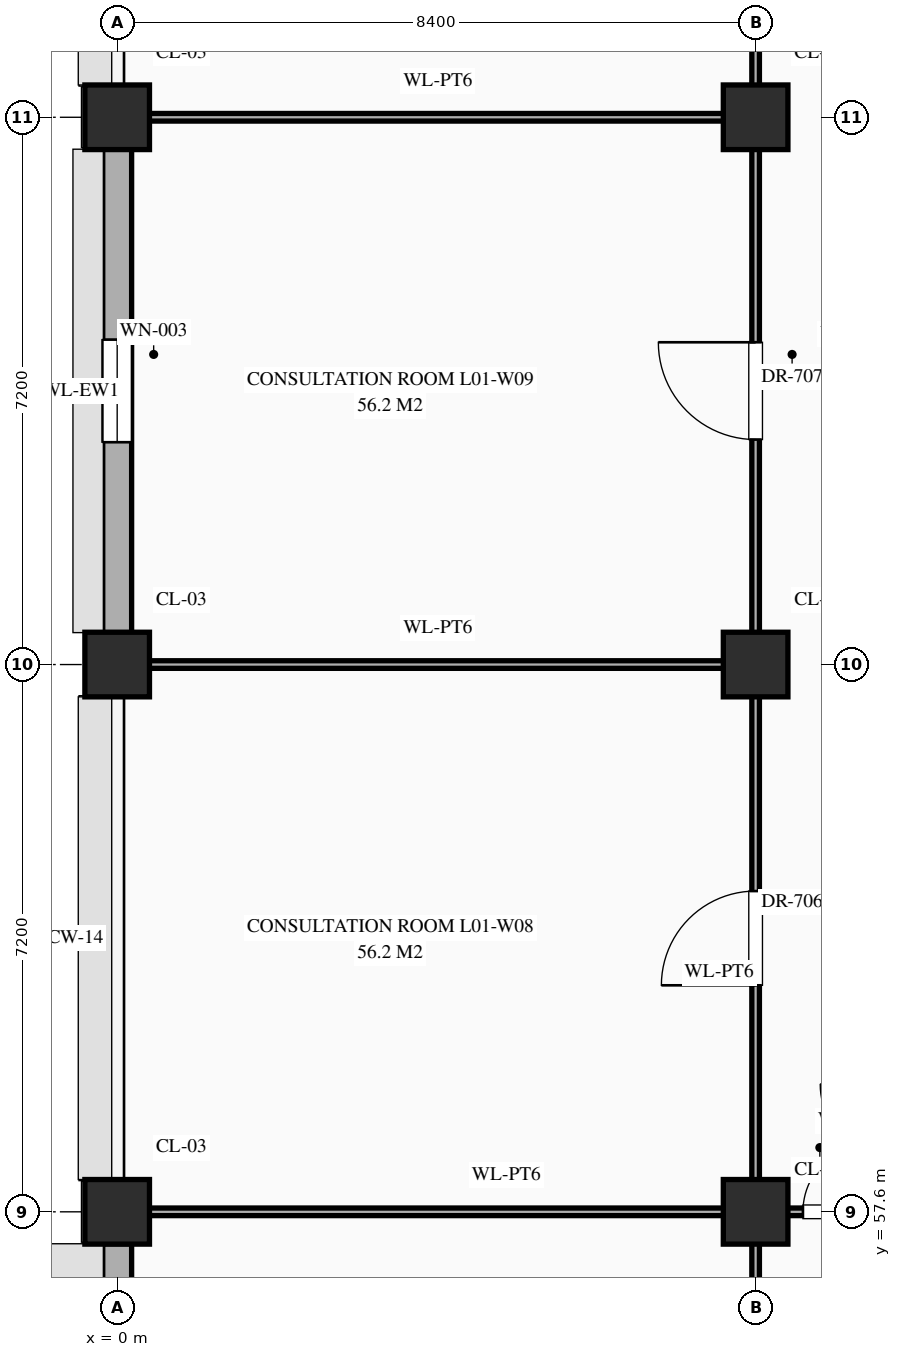
"""IFC4 building model, lengths in metres.
Left out: names, types, materials, properties, quantities, classifications, styles, units other than length and angle.
Written with IfcOpenShell. Run it as: python <this file> out.ifc"""

import sys

from ifc_helpers import new_model, si_unit, direction, frame, frame_2d, origin, origin_2d, place, context, subcontext, project, spatial, rectangle, extrude, element, fill, save


model = new_model("IFC4")
c1 = context("Model", 3, precision=1e-05, world=origin(), true_north=direction((0.0, 1.0)))
c2 = subcontext(c1, "Body", "Model", "MODEL_VIEW")
j1 = project(units=[si_unit("LENGTHUNIT", "METRE"), si_unit("PLANEANGLEUNIT", "RADIAN")], contexts=[c1])
p1 = place(None, origin())
s1 = spatial("IfcSite", under=j1, at=p1, CompositionType="ELEMENT")
p2 = place(p1, origin())
s2 = spatial("IfcBuilding", under=s1, at=p2, CompositionType="ELEMENT")
p3 = place(p2, origin())
s3 = spatial("IfcBuildingStorey", under=s2, at=p3, CompositionType="ELEMENT", Elevation=0.0)
for number, where, z_axis, x_axis in (
    (1, (0.0, 57.6, 0.0), (0.0, 0.0, 1.0), (1.0, 0.0, 0.0)),
    (2, (0.0, 64.8, 0.0), (0.0, 0.0, 1.0), (1.0, 0.0, 0.0)),
    (3, (0.0, 72.0, 0.0), (0.0, 0.0, 1.0), (1.0, 0.0, 0.0)),
    (4, (8.4, 57.6, 0.0), (0.0, 0.0, 1.0), (1.0, 0.0, 0.0)),
    (5, (8.4, 64.8, 0.0), (0.0, 0.0, 1.0), (1.0, 0.0, 0.0)),
    (6, (8.4, 72.0, 0.0), (0.0, 0.0, 1.0), (1.0, 0.0, 0.0)),
):
    element("IfcColumn", number, at=place(p3, frame(where, z_axis=z_axis, x_axis=x_axis)), inside=s3, PredefinedType="COLUMN", context=c2, shape_type="SweptSolid", body=[
        extrude(rectangle(XDim=0.85, YDim=0.85, at=origin_2d()), origin(), (0.0, 0.0, 1.0), 5.4),
    ])
p4 = place(p3, frame((0.0, 50.82, 0.0), z_axis=(0.0, 0.0, 1.0), x_axis=(0.0, 1.0, 0.0)))
e7 = element("IfcWall", 7, at=p4, inside=s3, PredefinedType="STANDARD", context=c2, shape_type="SweptSolid", body=[
    extrude(rectangle(XDim=6.36, YDim=0.38, at=frame_2d((3.18, 0.0))), origin(), (0.0, 0.0, 1.0), 4.47),
])
p5 = place(p4, frame((1.98, 0.0, 0.0)))
e8 = element("IfcOpeningElement", 8, at=p5, cuts=e7, PredefinedType="OPENING", context=c2, shape_type="SweptSolid", body=[
    extrude(rectangle(XDim=2.4, YDim=2.4, at=frame_2d((1.2, 1.2))), frame((0.0, 0.202, 0.0), z_axis=(0.0, -1.0, 0.0), x_axis=(1.0, 0.0, 0.0)), (0.0, 0.0, 1.0), 0.404),
])
p6 = place(p3, frame((0.0, 65.22, 0.0), z_axis=(0.0, 0.0, 1.0), x_axis=(0.0, 1.0, 0.0)))
e9 = element("IfcWall", 9, at=p6, inside=s3, PredefinedType="STANDARD", context=c2, shape_type="SweptSolid", body=[
    extrude(rectangle(XDim=6.36, YDim=0.38, at=frame_2d((3.18, 0.0))), origin(), (0.0, 0.0, 1.0), 4.47),
])
p7 = place(p6, frame((2.505, 0.0, 0.85)))
e10 = element("IfcOpeningElement", 10, at=p7, cuts=e9, PredefinedType="OPENING", context=c2, shape_type="SweptSolid", body=[
    extrude(rectangle(XDim=1.35, YDim=1.2, at=frame_2d((0.675, 0.6))), frame((0.0, 0.202, 0.0), z_axis=(0.0, -1.0, 0.0), x_axis=(1.0, 0.0, 0.0)), (0.0, 0.0, 1.0), 0.404),
])
p8 = place(p3, frame((0.04, 57.6, 0.0), z_axis=(0.0, 0.0, 1.0), x_axis=(1.0, 0.0, 0.0)))
e11 = element("IfcWall", 11, at=p8, inside=s3, PredefinedType="STANDARD", context=c2, shape_type="SweptSolid", body=[
    extrude(rectangle(XDim=10.16, YDim=0.1, at=frame_2d((5.08, 0.0))), origin(), (0.0, 0.0, 1.0), 4.27),
])
p9 = place(p8, frame((8.982, 0.0, 0.0)))
e12 = element("IfcOpeningElement", 12, at=p9, cuts=e11, PredefinedType="OPENING", context=c2, shape_type="SweptSolid", body=[
    extrude(rectangle(XDim=0.9, YDim=2.15, at=frame_2d((0.45, 1.075))), frame((0.0, 0.062, 0.0), z_axis=(0.0, -1.0, 0.0), x_axis=(1.0, 0.0, 0.0)), (0.0, 0.0, 1.0), 0.124),
])
for number, where, z_axis, x_axis in (
    (13, (0.04, 64.8, 0.0), (0.0, 0.0, 1.0), (1.0, 0.0, 0.0)),
    (14, (0.04, 72.0, 0.0), (0.0, 0.0, 1.0), (1.0, 0.0, 0.0)),
):
    element("IfcWall", number, at=place(p3, frame(where, z_axis=z_axis, x_axis=x_axis)), inside=s3, PredefinedType="STANDARD", context=c2, shape_type="SweptSolid", body=[
        extrude(rectangle(XDim=8.36, YDim=0.1, at=frame_2d((4.18, 0.0))), origin(), (0.0, 0.0, 1.0), 4.27),
    ])
p10 = place(p3, frame((8.4, 43.2, 0.0), z_axis=(0.0, 0.0, 1.0), x_axis=(0.0, 1.0, 0.0)))
e15 = element("IfcWall", 15, at=p10, inside=s3, PredefinedType="STANDARD", context=c2, shape_type="SweptSolid", body=[
    extrude(rectangle(XDim=52.8, YDim=0.1, at=frame_2d((26.4, 0.0))), origin(), (0.0, 0.0, 1.0), 4.37),
])
p11 = place(p10, frame((51.272, 0.0, 0.0)))
e16 = element("IfcOpeningElement", 16, at=p11, cuts=e15, PredefinedType="OPENING", context=c2, shape_type="SweptSolid", body=[
    extrude(rectangle(XDim=1.0, YDim=2.25, at=frame_2d((0.5, 1.125))), frame((0.0, 0.062, 0.0), z_axis=(0.0, -1.0, 0.0), x_axis=(1.0, 0.0, 0.0)), (0.0, 0.0, 1.0), 0.124),
])
p12 = place(p10, frame((46.26, 0.0, 0.0)))
e17 = element("IfcOpeningElement", 17, at=p12, cuts=e15, PredefinedType="OPENING", context=c2, shape_type="SweptSolid", body=[
    extrude(rectangle(XDim=1.08, YDim=2.25, at=frame_2d((0.54, 1.125))), frame((0.0, 0.062, 0.0), z_axis=(0.0, -1.0, 0.0), x_axis=(1.0, 0.0, 0.0)), (0.0, 0.0, 1.0), 0.124),
])
p13 = place(p10, frame((41.268, 0.0, 0.0)))
e18 = element("IfcOpeningElement", 18, at=p13, cuts=e15, PredefinedType="OPENING", context=c2, shape_type="SweptSolid", body=[
    extrude(rectangle(XDim=1.12, YDim=2.25, at=frame_2d((0.56, 1.125))), frame((0.0, 0.062, 0.0), z_axis=(0.0, -1.0, 0.0), x_axis=(1.0, 0.0, 0.0)), (0.0, 0.0, 1.0), 0.124),
])
p14 = place(p10, frame((37.992, 0.0, 0.0)))
e19 = element("IfcOpeningElement", 19, at=p14, cuts=e15, PredefinedType="OPENING", context=c2, shape_type="SweptSolid", body=[
    extrude(rectangle(XDim=1.16, YDim=2.3, at=frame_2d((0.58, 1.15))), frame((0.0, 0.062, 0.0), z_axis=(0.0, -1.0, 0.0), x_axis=(1.0, 0.0, 0.0)), (0.0, 0.0, 1.0), 0.124),
])
p15 = place(p10, frame((17.38, 0.0, 0.0)))
e20 = element("IfcOpeningElement", 20, at=p15, cuts=e15, PredefinedType="OPENING", context=c2, shape_type="SweptSolid", body=[
    extrude(rectangle(XDim=1.24, YDim=2.3, at=frame_2d((0.62, 1.15))), frame((0.0, 0.062, 0.0), z_axis=(0.0, -1.0, 0.0), x_axis=(1.0, 0.0, 0.0)), (0.0, 0.0, 1.0), 0.124),
])
p16 = place(p10, frame((24.56, 0.0, 0.0)))
e21 = element("IfcOpeningElement", 21, at=p16, cuts=e15, PredefinedType="OPENING", context=c2, shape_type="SweptSolid", body=[
    extrude(rectangle(XDim=1.28, YDim=2.35, at=frame_2d((0.64, 1.175))), frame((0.0, 0.062, 0.0), z_axis=(0.0, -1.0, 0.0), x_axis=(1.0, 0.0, 0.0)), (0.0, 0.0, 1.0), 0.124),
])
p17 = place(p10, frame((31.93, 0.0, 0.0)))
e22 = element("IfcOpeningElement", 22, at=p17, cuts=e15, PredefinedType="OPENING", context=c2, shape_type="SweptSolid", body=[
    extrude(rectangle(XDim=0.94, YDim=2.3, at=frame_2d((0.47, 1.15))), frame((0.0, 0.062, 0.0), z_axis=(0.0, -1.0, 0.0), x_axis=(1.0, 0.0, 0.0)), (0.0, 0.0, 1.0), 0.124),
])
p18 = place(p10, frame((0.772, 0.0, 0.0)))
e23 = element("IfcOpeningElement", 23, at=p18, cuts=e15, PredefinedType="OPENING", context=c2, shape_type="SweptSolid", body=[
    extrude(rectangle(XDim=1.2, YDim=2.35, at=frame_2d((0.6, 1.175))), frame((0.0, 0.062, 0.0), z_axis=(0.0, -1.0, 0.0), x_axis=(1.0, 0.0, 0.0)), (0.0, 0.0, 1.0), 0.124),
])
p19 = place(p10, frame((4.008, 0.0, 0.0)))
e24 = element("IfcOpeningElement", 24, at=p19, cuts=e15, PredefinedType="OPENING", context=c2, shape_type="SweptSolid", body=[
    extrude(rectangle(XDim=1.24, YDim=2.3, at=frame_2d((0.62, 1.15))), frame((0.0, 0.062, 0.0), z_axis=(0.0, -1.0, 0.0), x_axis=(1.0, 0.0, 0.0)), (0.0, 0.0, 1.0), 0.124),
])
p20 = place(p10, frame((10.16, 0.0, 0.0)))
e25 = element("IfcOpeningElement", 25, at=p20, cuts=e15, PredefinedType="OPENING", context=c2, shape_type="SweptSolid", body=[
    extrude(rectangle(XDim=1.28, YDim=2.35, at=frame_2d((0.64, 1.175))), frame((0.0, 0.062, 0.0), z_axis=(0.0, -1.0, 0.0), x_axis=(1.0, 0.0, 0.0)), (0.0, 0.0, 1.0), 0.124),
])
p21 = place(p7, origin())
e26 = element("IfcWindow", 26, at=p21, inside=s3, PartitioningType="SINGLE_PANEL", PredefinedType="WINDOW", context=c2, shape_type="SweptSolid", body=[
    extrude(rectangle(XDim=1.35, YDim=1.2, at=frame_2d((0.675, 0.6))), frame((0.0, 0.03, 0.0), z_axis=(0.0, -1.0, 0.0), x_axis=(1.0, 0.0, 0.0)), (0.0, 0.0, 1.0), 0.06),
])
fill(e10, e26)
p22 = place(p9, origin())
e27 = element("IfcDoor", 27, at=p22, inside=s3, OperationType="SINGLE_SWING_RIGHT", PredefinedType="DOOR", context=c2, shape_type="SweptSolid", body=[
    extrude(rectangle(XDim=0.9, YDim=2.15, at=frame_2d((0.45, 1.075))), frame((0.0, 0.025, 0.0), z_axis=(0.0, -1.0, 0.0), x_axis=(1.0, 0.0, 0.0)), (0.0, 0.0, 1.0), 0.05),
])
fill(e12, e27)
p23 = place(p15, origin())
e28 = element("IfcDoor", 28, at=p23, inside=s3, OperationType="SINGLE_SWING_LEFT", PredefinedType="DOOR", context=c2, shape_type="SweptSolid", body=[
    extrude(rectangle(XDim=1.24, YDim=2.3, at=frame_2d((0.62, 1.15))), frame((0.0, 0.025, 0.0), z_axis=(0.0, -1.0, 0.0), x_axis=(1.0, 0.0, 0.0)), (0.0, 0.0, 1.0), 0.05),
])
fill(e20, e28)
p24 = place(p16, origin())
e29 = element("IfcDoor", 29, at=p24, inside=s3, OperationType="SINGLE_SWING_RIGHT", PredefinedType="DOOR", context=c2, shape_type="SweptSolid", body=[
    extrude(rectangle(XDim=1.28, YDim=2.35, at=frame_2d((0.64, 1.175))), frame((0.0, 0.025, 0.0), z_axis=(0.0, -1.0, 0.0), x_axis=(1.0, 0.0, 0.0)), (0.0, 0.0, 1.0), 0.05),
])
fill(e21, e29)
save(model, sys.argv[1])
